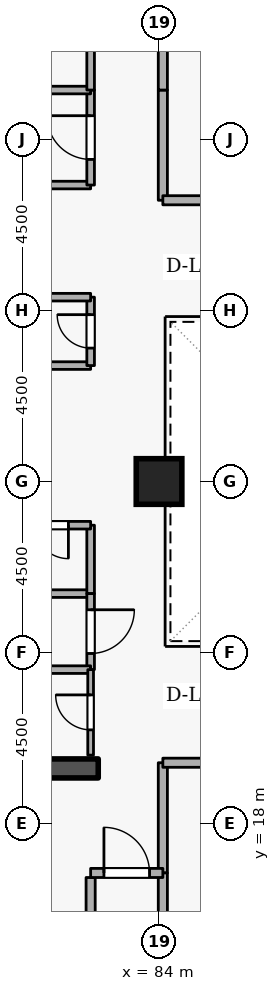
"""IFC4 building model, lengths in metres.
Left out: names, types, materials, properties, quantities, classifications, styles, units other than length and angle.
Written with IfcOpenShell. Run it as: python <this file> out.ifc"""

import sys

from ifc_helpers import new_model, si_unit, direction, frame, frame_2d, origin, origin_2d, place, context, subcontext, project, spatial, rectangle, extrude, element, fill, save


model = new_model("IFC4")
c1 = context("Model", 3, precision=1e-05, world=origin(), true_north=direction((0.0, 1.0)))
c2 = subcontext(c1, "Body", "Model", "MODEL_VIEW")
j1 = project(units=[si_unit("LENGTHUNIT", "METRE"), si_unit("PLANEANGLEUNIT", "RADIAN")], contexts=[c1])
p1 = place(None, origin())
s1 = spatial("IfcSite", under=j1, at=p1, CompositionType="ELEMENT")
p2 = place(p1, origin())
s2 = spatial("IfcBuilding", under=s1, at=p2, CompositionType="ELEMENT")
p3 = place(p2, frame((0.0, 0.0, 141.3)))
s3 = spatial("IfcBuildingStorey", under=s2, at=p3, CompositionType="ELEMENT", Elevation=141.3)
p4 = place(p3, frame((76.6, 19.45, 0.0), z_axis=(0.0, 0.0, 1.0), x_axis=(1.0, 0.0, 0.0)))
e1 = element("IfcWall", 1, at=p4, inside=s3, PredefinedType="SHEAR", context=c2, shape_type="SweptSolid", body=[
    extrude(rectangle(XDim=5.8, YDim=0.5, at=frame_2d((2.9, 0.0))), origin(), (0.0, 0.0, 1.0), 4.2),
])
p5 = place(p3, frame((84.0, 27.0, 0.0), z_axis=(0.0, 0.0, 1.0), x_axis=(1.0, 0.0, 0.0)))
e2 = element("IfcColumn", 2, at=p5, inside=s3, PredefinedType="COLUMN", context=c2, shape_type="SweptSolid", body=[
    extrude(rectangle(XDim=1.2, YDim=1.2, at=origin_2d()), origin(), (0.0, 0.0, 1.0), 4.2),
])
p6 = place(p3, frame((79.9, 34.8, 0.0), z_axis=(0.0, 0.0, 1.0), x_axis=(1.0, 0.0, 0.0)))
e3 = element("IfcWall", 3, at=p6, inside=s3, PredefinedType="STANDARD", context=c2, shape_type="SweptSolid", body=[
    extrude(rectangle(XDim=2.3, YDim=0.2, at=frame_2d((1.15, 0.0))), origin(), (0.0, 0.0, 1.0), 3.145),
])
p7 = place(p3, frame((82.2, 34.8, 0.0), z_axis=(0.0, 0.0, 1.0), x_axis=(0.0, 1.0, 0.0)))
e4 = element("IfcWall", 4, at=p7, inside=s3, PredefinedType="STANDARD", context=c2, shape_type="SweptSolid", body=[
    extrude(rectangle(XDim=2.5, YDim=0.2, at=frame_2d((1.25, 0.0))), origin(), (0.0, 0.0, 1.0), 3.94),
])
p8 = place(p7, frame((0.675, 0.0, 0.0)))
e5 = element("IfcOpeningElement", 5, at=p8, cuts=e4, PredefinedType="OPENING", context=c2, shape_type="SweptSolid", body=[
    extrude(rectangle(XDim=1.15, YDim=2.1, at=frame_2d((0.575, 1.05))), frame((0.0, 0.11, 0.0), z_axis=(0.0, -1.0, 0.0), x_axis=(1.0, 0.0, 0.0)), (0.0, 0.0, 1.0), 0.22),
])
p9 = place(p3, frame((82.2, 37.3, 0.0), z_axis=(0.0, 0.0, 1.0), x_axis=(-1.0, 0.0, 0.0)))
e6 = element("IfcWall", 6, at=p9, inside=s3, PredefinedType="STANDARD", context=c2, shape_type="SweptSolid", body=[
    extrude(rectangle(XDim=5.7, YDim=0.2, at=frame_2d((2.85, 0.0))), origin(), (0.0, 0.0, 1.0), 3.94),
])
p10 = place(p9, frame((2.275, 0.0, 0.0)))
e7 = element("IfcOpeningElement", 7, at=p10, cuts=e6, PredefinedType="OPENING", context=c2, shape_type="SweptSolid", body=[
    extrude(rectangle(XDim=1.15, YDim=2.1, at=frame_2d((0.575, 1.05))), frame((0.0, 0.11, 0.0), z_axis=(0.0, -1.0, 0.0), x_axis=(1.0, 0.0, 0.0)), (0.0, 0.0, 1.0), 0.22),
])
p11 = place(p3, frame((80.15, 24.05, 0.0), z_axis=(0.0, 0.0, 1.0), x_axis=(1.0, 0.0, 0.0)))
e8 = element("IfcWall", 8, at=p11, inside=s3, PredefinedType="STANDARD", context=c2, shape_type="SweptSolid", body=[
    extrude(rectangle(XDim=2.05, YDim=0.2, at=frame_2d((1.025, 0.0))), origin(), (0.0, 0.0, 1.0), 3.94),
])
p12 = place(p3, frame((82.2, 24.05, 0.0), z_axis=(0.0, 0.0, 1.0), x_axis=(0.0, 1.0, 0.0)))
e9 = element("IfcWall", 9, at=p12, inside=s3, PredefinedType="STANDARD", context=c2, shape_type="SweptSolid", body=[
    extrude(rectangle(XDim=1.8, YDim=0.2, at=frame_2d((0.9, 0.0))), origin(), (0.0, 0.0, 1.0), 3.94),
])
p13 = place(p3, frame((82.2, 25.85, 0.0), z_axis=(0.0, 0.0, 1.0), x_axis=(-1.0, 0.0, 0.0)))
e10 = element("IfcWall", 10, at=p13, inside=s3, PredefinedType="STANDARD", context=c2, shape_type="SweptSolid", body=[
    extrude(rectangle(XDim=2.05, YDim=0.2, at=frame_2d((1.025, 0.0))), origin(), (0.0, 0.0, 1.0), 3.94),
])
p14 = place(p13, frame((0.585, 0.0, 0.0)))
e11 = element("IfcOpeningElement", 11, at=p14, cuts=e10, PredefinedType="OPENING", context=c2, shape_type="SweptSolid", body=[
    extrude(rectangle(XDim=0.88, YDim=2.04, at=frame_2d((0.44, 1.02))), frame((0.0, 0.11, 0.0), z_axis=(0.0, -1.0, 0.0), x_axis=(1.0, 0.0, 0.0)), (0.0, 0.0, 1.0), 0.22),
])
p15 = place(p3, frame((80.15, 30.05, 0.0), z_axis=(0.0, 0.0, 1.0), x_axis=(1.0, 0.0, 0.0)))
e12 = element("IfcWall", 12, at=p15, inside=s3, PredefinedType="STANDARD", context=c2, shape_type="SweptSolid", body=[
    extrude(rectangle(XDim=2.05, YDim=0.2, at=frame_2d((1.025, 0.0))), origin(), (0.0, 0.0, 1.0), 3.94),
])
p16 = place(p3, frame((82.2, 30.05, 0.0), z_axis=(0.0, 0.0, 1.0), x_axis=(0.0, 1.0, 0.0)))
e13 = element("IfcWall", 13, at=p16, inside=s3, PredefinedType="STANDARD", context=c2, shape_type="SweptSolid", body=[
    extrude(rectangle(XDim=1.8, YDim=0.2, at=frame_2d((0.9, 0.0))), origin(), (0.0, 0.0, 1.0), 3.94),
])
p17 = place(p16, frame((0.46, 0.0, 0.0)))
e14 = element("IfcOpeningElement", 14, at=p17, cuts=e13, PredefinedType="OPENING", context=c2, shape_type="SweptSolid", body=[
    extrude(rectangle(XDim=0.88, YDim=2.04, at=frame_2d((0.44, 1.02))), frame((0.0, 0.11, 0.0), z_axis=(0.0, -1.0, 0.0), x_axis=(1.0, 0.0, 0.0)), (0.0, 0.0, 1.0), 0.22),
])
p18 = place(p3, frame((82.2, 31.85, 0.0), z_axis=(0.0, 0.0, 1.0), x_axis=(-1.0, 0.0, 0.0)))
e15 = element("IfcWall", 15, at=p18, inside=s3, PredefinedType="STANDARD", context=c2, shape_type="SweptSolid", body=[
    extrude(rectangle(XDim=2.05, YDim=0.2, at=frame_2d((1.025, 0.0))), origin(), (0.0, 0.0, 1.0), 3.94),
])
p19 = place(p3, frame((82.2, 24.05, 0.0), z_axis=(0.0, 0.0, 1.0), x_axis=(0.0, -1.0, 0.0)))
e16 = element("IfcWall", 16, at=p19, inside=s3, PredefinedType="STANDARD", context=c2, shape_type="SweptSolid", body=[
    extrude(rectangle(XDim=2.0, YDim=0.2, at=frame_2d((1.0, 0.0))), origin(), (0.0, 0.0, 1.0), 3.94),
])
p20 = place(p19, frame((0.425, 0.0, 0.0)))
e17 = element("IfcOpeningElement", 17, at=p20, cuts=e16, PredefinedType="OPENING", context=c2, shape_type="SweptSolid", body=[
    extrude(rectangle(XDim=1.15, YDim=2.1, at=frame_2d((0.575, 1.05))), frame((0.0, 0.11, 0.0), z_axis=(0.0, -1.0, 0.0), x_axis=(1.0, 0.0, 0.0)), (0.0, 0.0, 1.0), 0.22),
])
p21 = place(p3, frame((82.2, 22.05, 0.0), z_axis=(0.0, 0.0, 1.0), x_axis=(-1.0, 0.0, 0.0)))
e18 = element("IfcWall", 18, at=p21, inside=s3, PredefinedType="STANDARD", context=c2, shape_type="SweptSolid", body=[
    extrude(rectangle(XDim=2.05, YDim=0.2, at=frame_2d((1.025, 0.0))), origin(), (0.0, 0.0, 1.0), 3.94),
])
p22 = place(p3, frame((84.1, 34.4, 0.0), z_axis=(0.0, 0.0, 1.0), x_axis=(0.0, 1.0, 0.0)))
e19 = element("IfcWall", 19, at=p22, inside=s3, PredefinedType="STANDARD", context=c2, shape_type="SweptSolid", body=[
    extrude(rectangle(XDim=2.9, YDim=0.24, at=frame_2d((1.45, 0.0))), origin(), (0.0, 0.0, 1.0), 3.94),
])
p23 = place(p3, frame((84.1, 37.3, 0.0), z_axis=(0.0, 0.0, 1.0), x_axis=(0.0, 1.0, 0.0)))
e20 = element("IfcWall", 20, at=p23, inside=s3, PredefinedType="STANDARD", context=c2, shape_type="SweptSolid", body=[
    extrude(rectangle(XDim=3.75, YDim=0.24, at=frame_2d((1.875, 0.0))), origin(), (0.0, 0.0, 1.0), 3.94),
])
p24 = place(p3, frame((88.5, 34.4, 0.0), z_axis=(0.0, 0.0, 1.0), x_axis=(-1.0, 0.0, 0.0)))
e21 = element("IfcWall", 21, at=p24, inside=s3, PredefinedType="STANDARD", context=c2, shape_type="SweptSolid", body=[
    extrude(rectangle(XDim=4.4, YDim=0.24, at=frame_2d((2.2, 0.0))), origin(), (0.0, 0.0, 1.0), 3.145),
])
p25 = place(p24, frame((1.6, 0.0, 0.0)))
e22 = element("IfcOpeningElement", 22, at=p25, cuts=e21, PredefinedType="OPENING", context=c2, shape_type="SweptSolid", body=[
    extrude(rectangle(XDim=1.2, YDim=2.1, at=frame_2d((0.6, 1.05))), frame((0.0, 0.13, 0.0), z_axis=(0.0, -1.0, 0.0), x_axis=(1.0, 0.0, 0.0)), (0.0, 0.0, 1.0), 0.26),
])
p26 = place(p3, frame((82.2, 41.05, 0.0), z_axis=(0.0, 0.0, 1.0), x_axis=(0.0, -1.0, 0.0)))
e23 = element("IfcWall", 23, at=p26, inside=s3, PredefinedType="STANDARD", context=c2, shape_type="SweptSolid", body=[
    extrude(rectangle(XDim=3.75, YDim=0.2, at=frame_2d((1.875, 0.0))), origin(), (0.0, 0.0, 1.0), 3.94),
])
p27 = place(p3, frame((84.1, 16.7, 0.0), z_axis=(0.0, 0.0, 1.0), x_axis=(0.0, 1.0, 0.0)))
e24 = element("IfcWall", 24, at=p27, inside=s3, PredefinedType="STANDARD", context=c2, shape_type="SweptSolid", body=[
    extrude(rectangle(XDim=2.9, YDim=0.24, at=frame_2d((1.45, 0.0))), origin(), (0.0, 0.0, 1.0), 3.94),
])
p28 = place(p3, frame((84.1, 19.6, 0.0), z_axis=(0.0, 0.0, 1.0), x_axis=(1.0, 0.0, 0.0)))
e25 = element("IfcWall", 25, at=p28, inside=s3, PredefinedType="STANDARD", context=c2, shape_type="SweptSolid", body=[
    extrude(rectangle(XDim=4.4, YDim=0.24, at=frame_2d((2.2, 0.0))), origin(), (0.0, 0.0, 1.0), 3.145),
])
p29 = place(p28, frame((1.6, 0.0, 0.0)))
e26 = element("IfcOpeningElement", 26, at=p29, cuts=e25, PredefinedType="OPENING", context=c2, shape_type="SweptSolid", body=[
    extrude(rectangle(XDim=1.2, YDim=2.1, at=frame_2d((0.6, 1.05))), frame((0.0, 0.13, 0.0), z_axis=(0.0, -1.0, 0.0), x_axis=(1.0, 0.0, 0.0)), (0.0, 0.0, 1.0), 0.26),
])
p30 = place(p3, frame((84.1, 7.0, 0.0), z_axis=(0.0, 0.0, 1.0), x_axis=(0.0, 1.0, 0.0)))
e27 = element("IfcWall", 27, at=p30, inside=s3, PredefinedType="STANDARD", context=c2, shape_type="SweptSolid", body=[
    extrude(rectangle(XDim=9.7, YDim=0.24, at=frame_2d((4.85, 0.0))), origin(), (0.0, 0.0, 1.0), 3.94),
])
p31 = place(p3, frame((82.2, 12.52, 0.0), z_axis=(0.0, 0.0, 1.0), x_axis=(0.0, 1.0, 0.0)))
e28 = element("IfcWall", 28, at=p31, inside=s3, PredefinedType="STANDARD", context=c2, shape_type="SweptSolid", body=[
    extrude(rectangle(XDim=4.06, YDim=0.24, at=frame_2d((2.03, 0.0))), origin(), (0.0, 0.0, 1.0), 3.94),
])
p32 = place(p3, frame((82.2, 16.7, 0.0), z_axis=(0.0, 0.0, 1.0), x_axis=(1.0, 0.0, 0.0)))
e29 = element("IfcWall", 29, at=p32, inside=s3, PredefinedType="STANDARD", context=c2, shape_type="SweptSolid", body=[
    extrude(rectangle(XDim=1.9, YDim=0.24, at=frame_2d((0.95, 0.0))), origin(), (0.0, 0.0, 1.0), 3.94),
])
p33 = place(p32, frame((0.35, 0.0, 0.0)))
e30 = element("IfcOpeningElement", 30, at=p33, cuts=e29, PredefinedType="OPENING", context=c2, shape_type="SweptSolid", body=[
    extrude(rectangle(XDim=1.2, YDim=2.1, at=frame_2d((0.6, 1.05))), frame((0.0, 0.13, 0.0), z_axis=(0.0, -1.0, 0.0), x_axis=(1.0, 0.0, 0.0)), (0.0, 0.0, 1.0), 0.26),
])
p34 = place(p3, frame((82.2, 19.8, 0.0), z_axis=(0.0, 0.0, 1.0), x_axis=(0.0, 1.0, 0.0)))
e31 = element("IfcWall", 31, at=p34, inside=s3, PredefinedType="PARTITIONING", context=c2, shape_type="SweptSolid", body=[
    extrude(rectangle(XDim=2.25, YDim=0.15, at=frame_2d((1.125, 0.0))), origin(), (0.0, 0.0, 1.0), 3.94),
])
p35 = place(p34, frame((0.665, 0.0, 0.0)))
e32 = element("IfcOpeningElement", 32, at=p35, cuts=e31, PredefinedType="OPENING", context=c2, shape_type="SweptSolid", body=[
    extrude(rectangle(XDim=0.92, YDim=2.08, at=frame_2d((0.46, 1.04))), frame((0.0, 0.085, 0.0), z_axis=(0.0, -1.0, 0.0), x_axis=(1.0, 0.0, 0.0)), (0.0, 0.0, 1.0), 0.17),
])
p36 = place(p8, origin())
e33 = element("IfcDoor", 33, at=p36, inside=s3, OperationType="SINGLE_SWING_RIGHT", PredefinedType="DOOR", context=c2, shape_type="SweptSolid", body=[
    extrude(rectangle(XDim=1.15, YDim=2.1, at=frame_2d((0.575, 1.05))), frame((0.0, 0.025, 0.0), z_axis=(0.0, -1.0, 0.0), x_axis=(1.0, 0.0, 0.0)), (0.0, 0.0, 1.0), 0.05),
])
fill(e5, e33)
p37 = place(p14, origin())
e34 = element("IfcDoor", 34, at=p37, inside=s3, OperationType="SINGLE_SWING_LEFT", PredefinedType="DOOR", context=c2, shape_type="SweptSolid", body=[
    extrude(rectangle(XDim=0.88, YDim=2.04, at=frame_2d((0.44, 1.02))), frame((0.0, 0.025, 0.0), z_axis=(0.0, -1.0, 0.0), x_axis=(1.0, 0.0, 0.0)), (0.0, 0.0, 1.0), 0.05),
])
fill(e11, e34)
p38 = place(p17, origin())
e35 = element("IfcDoor", 35, at=p38, inside=s3, OperationType="SINGLE_SWING_RIGHT", PredefinedType="DOOR", context=c2, shape_type="SweptSolid", body=[
    extrude(rectangle(XDim=0.88, YDim=2.04, at=frame_2d((0.44, 1.02))), frame((0.0, 0.025, 0.0), z_axis=(0.0, -1.0, 0.0), x_axis=(1.0, 0.0, 0.0)), (0.0, 0.0, 1.0), 0.05),
])
fill(e14, e35)
p39 = place(p35, origin())
e36 = element("IfcDoor", 36, at=p39, inside=s3, OperationType="SINGLE_SWING_RIGHT", PredefinedType="DOOR", context=c2, shape_type="SweptSolid", body=[
    extrude(rectangle(XDim=0.92, YDim=2.08, at=frame_2d((0.46, 1.04))), frame((0.0, 0.025, 0.0), z_axis=(0.0, -1.0, 0.0), x_axis=(1.0, 0.0, 0.0)), (0.0, 0.0, 1.0), 0.05),
])
fill(e32, e36)
p40 = place(p20, origin())
e37 = element("IfcDoor", 37, at=p40, inside=s3, OperationType="SINGLE_SWING_LEFT", PredefinedType="DOOR", context=c2, shape_type="SweptSolid", body=[
    extrude(rectangle(XDim=1.15, YDim=2.1, at=frame_2d((0.575, 1.05))), frame((0.0, 0.025, 0.0), z_axis=(0.0, -1.0, 0.0), x_axis=(1.0, 0.0, 0.0)), (0.0, 0.0, 1.0), 0.05),
])
fill(e17, e37)
p41 = place(p33, origin())
e38 = element("IfcDoor", 38, at=p41, inside=s3, OperationType="SINGLE_SWING_LEFT", PredefinedType="DOOR", context=c2, shape_type="SweptSolid", body=[
    extrude(rectangle(XDim=1.2, YDim=2.1, at=frame_2d((0.6, 1.05))), frame((0.0, 0.025, 0.0), z_axis=(0.0, -1.0, 0.0), x_axis=(1.0, 0.0, 0.0)), (0.0, 0.0, 1.0), 0.05),
])
fill(e30, e38)
save(model, sys.argv[1])
